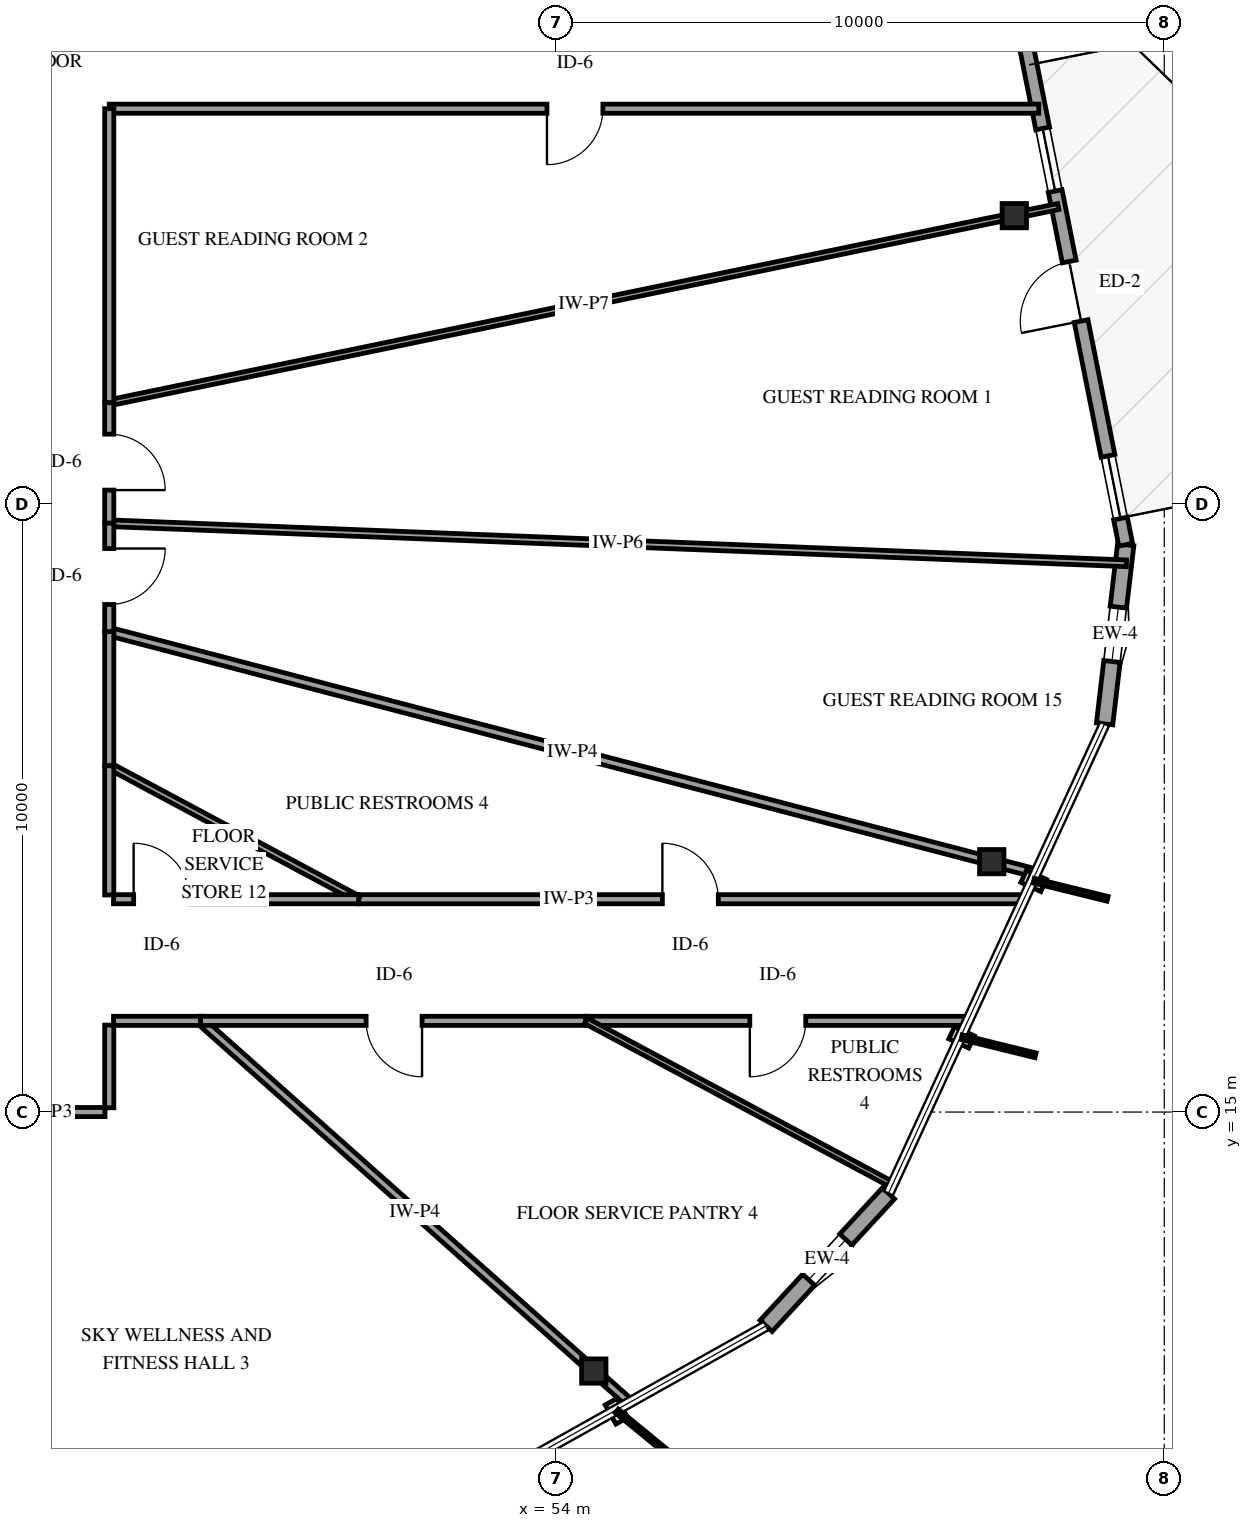
"""IFC4 building model, lengths in metres.
Left out: names, types, materials, properties, quantities, classifications, styles, units other than length and angle.
Written with IfcOpenShell. Run it as: python <this file> out.ifc"""

import sys

from ifc_helpers import new_model, si_unit, direction, frame, frame_2d, origin, origin_2d, place, context, subcontext, project, spatial, rectangle, i_section, extrude, element, fill, save


model = new_model("IFC4")
c1 = context("Model", 3, precision=1e-05, world=origin(), true_north=direction((0.0, 1.0)))
c2 = subcontext(c1, "Body", "Model", "MODEL_VIEW")
j1 = project(units=[si_unit("LENGTHUNIT", "METRE"), si_unit("PLANEANGLEUNIT", "RADIAN")], contexts=[c1])
p1 = place(None, origin())
s1 = spatial("IfcSite", under=j1, at=p1, CompositionType="ELEMENT")
p2 = place(p1, origin())
s2 = spatial("IfcBuilding", under=s1, at=p2, CompositionType="ELEMENT")
p3 = place(p2, frame((0.0, 0.0, 272.5)))
s3 = spatial("IfcBuildingStorey", under=s2, at=p3, CompositionType="ELEMENT", Elevation=272.5)
for number, where, z_axis, x_axis in (
    (1, (61.534, 29.741, 0.0), (0.0, 0.0, 1.0), (1.0, 0.0, 0.0)),
    (2, (54.618, 10.74, 0.0), (0.0, 0.0, 1.0), (1.0, 0.0, 0.0)),
    (3, (61.163, 19.117, 0.0), (0.0, 0.0, 1.0), (1.0, 0.0, 0.0)),
):
    element("IfcColumn", number, at=place(p3, frame(where, z_axis=z_axis, x_axis=x_axis)), inside=s3, PredefinedType="COLUMN", context=c2, shape_type="SweptSolid", body=[
        extrude(i_section(OverallWidth=0.401, OverallDepth=0.399, WebThickness=0.025, FlangeThickness=0.04, FilletRadius=0.038, at=origin_2d()), origin(), (0.0, 0.0, 1.0), 3.75),
    ])
p4 = place(p3, frame((57.452, 11.483, 0.0), z_axis=(0.0, 0.0, 1.0), x_axis=(0.678358713044, 0.734730873475, 0.0)))
e4 = element("IfcWall", 4, at=p4, inside=s3, PredefinedType="SOLIDWALL", context=c2, shape_type="SweptSolid", body=[
    extrude(rectangle(XDim=2.967, YDim=0.27, at=frame_2d((1.483, 0.0))), origin(), (0.0, 0.0, 1.0), 2.829),
])
p5 = place(p4, frame((1.033, 0.0, 0.75)))
e5 = element("IfcOpeningElement", 5, at=p5, cuts=e4, PredefinedType="OPENING", context=c2, shape_type="SweptSolid", body=[
    extrude(rectangle(XDim=0.9, YDim=1.5, at=frame_2d((0.45, 0.75))), frame((0.0, 0.145, 0.0), z_axis=(0.0, -1.0, 0.0), x_axis=(1.0, 0.0, 0.0)), (0.0, 0.0, 1.0), 0.29),
])
p6 = place(p3, frame((63.019, 21.383, 0.0), z_axis=(0.0, 0.0, 1.0), x_axis=(0.11702268659, 0.993129241752, 0.0)))
e6 = element("IfcWall", 6, at=p6, inside=s3, PredefinedType="SOLIDWALL", context=c2, shape_type="SweptSolid", body=[
    extrude(rectangle(XDim=2.967, YDim=0.27, at=frame_2d((1.483, 0.0))), origin(), (0.0, 0.0, 1.0), 2.829),
])
p7 = place(p6, frame((1.033, 0.0, 0.75)))
e7 = element("IfcOpeningElement", 7, at=p7, cuts=e6, PredefinedType="OPENING", context=c2, shape_type="SweptSolid", body=[
    extrude(rectangle(XDim=0.9, YDim=1.5, at=frame_2d((0.45, 0.75))), frame((0.0, 0.145, 0.0), z_axis=(0.0, -1.0, 0.0), x_axis=(1.0, 0.0, 0.0)), (0.0, 0.0, 1.0), 0.29),
])
p8 = place(p3, frame((63.366, 24.33, 0.0), z_axis=(0.0, 0.0, 1.0), x_axis=(-0.195602411619, 0.980683280457, 0.0)))
e8 = element("IfcWall", 8, at=p8, inside=s3, PredefinedType="SOLIDWALL", context=c2, shape_type="SweptSolid", body=[
    extrude(rectangle(XDim=8.5, YDim=0.23, at=frame_2d((4.25, 0.0))), origin(), (0.0, 0.0, 1.0), 2.829),
])
p9 = place(p8, frame((3.75, 0.0, 0.0)))
e9 = element("IfcOpeningElement", 9, at=p9, cuts=e8, PredefinedType="OPENING", context=c2, shape_type="SweptSolid", body=[
    extrude(rectangle(XDim=1.0, YDim=2.15, at=frame_2d((0.5, 1.075))), frame((0.0, 0.125, 0.0), z_axis=(0.0, -1.0, 0.0), x_axis=(1.0, 0.0, 0.0)), (0.0, 0.0, 1.0), 0.25),
])
p10 = place(p8, frame((0.44, 0.0, 0.72)))
e10 = element("IfcOpeningElement", 10, at=p10, cuts=e8, PredefinedType="OPENING", context=c2, shape_type="SweptSolid", body=[
    extrude(rectangle(XDim=1.05, YDim=1.55, at=frame_2d((0.525, 0.775))), frame((0.0, 0.125, 0.0), z_axis=(0.0, -1.0, 0.0), x_axis=(1.0, 0.0, 0.0)), (0.0, 0.0, 1.0), 0.25),
])
p11 = place(p8, frame((5.93, 0.0, 0.72)))
e11 = element("IfcOpeningElement", 11, at=p11, cuts=e8, PredefinedType="OPENING", context=c2, shape_type="SweptSolid", body=[
    extrude(rectangle(XDim=1.05, YDim=1.55, at=frame_2d((0.525, 0.775))), frame((0.0, 0.125, 0.0), z_axis=(0.0, -1.0, 0.0), x_axis=(1.0, 0.0, 0.0)), (0.0, 0.0, 1.0), 0.25),
])
p12 = place(p3, frame((63.378, 24.024, 0.0), z_axis=(0.0, 0.0, 1.0), x_axis=(-0.999224498299, 0.039375144421, 0.0)))
e12 = element("IfcWall", 12, at=p12, inside=s3, PredefinedType="PARTITIONING", context=c2, shape_type="SweptSolid", body=[
    extrude(rectangle(XDim=16.741, YDim=0.11, at=frame_2d((8.371, 0.0))), origin(), (0.0, 0.0, 1.0), 3.45),
])
p13 = place(p3, frame((46.65, 26.664, 0.0), z_axis=(0.0, 0.0, 1.0), x_axis=(0.979285564853, 0.202484030163, 0.0)))
e13 = element("IfcWall", 13, at=p13, inside=s3, PredefinedType="PARTITIONING", context=c2, shape_type="SweptSolid", body=[
    extrude(rectangle(XDim=15.937, YDim=0.1, at=frame_2d((7.969, 0.0))), origin(), (0.0, 0.0, 1.0), 2.745),
])
p14 = place(p3, frame((46.65, 22.901, 0.0), z_axis=(0.0, 0.0, 1.0), x_axis=(0.967652002087, -0.252288729151, 0.0)))
e14 = element("IfcWall", 14, at=p14, inside=s3, PredefinedType="PARTITIONING", context=c2, shape_type="SweptSolid", body=[
    extrude(rectangle(XDim=15.747, YDim=0.14, at=frame_2d((7.874, 0.0))), origin(), (0.0, 0.0, 1.0), 3.45),
])
p15 = place(p3, frame((61.936, 31.5, 0.0), z_axis=(0.0, 0.0, 1.0), x_axis=(-1.0, 0.0, 0.0)))
e15 = element("IfcWall", 15, at=p15, inside=s3, PredefinedType="PARTITIONING", context=c2, shape_type="SweptSolid", body=[
    extrude(rectangle(XDim=15.286, YDim=0.15, at=frame_2d((7.643, 0.0))), origin(), (0.0, 0.0, 1.0), 2.824),
])
p16 = place(p15, frame((7.168, 0.0, 0.0)))
e16 = element("IfcOpeningElement", 16, at=p16, cuts=e15, PredefinedType="OPENING", context=c2, shape_type="SweptSolid", body=[
    extrude(rectangle(XDim=0.92, YDim=2.12, at=frame_2d((0.46, 1.06))), frame((0.0, 0.085, 0.0), z_axis=(0.0, -1.0, 0.0), x_axis=(1.0, 0.0, 0.0)), (0.0, 0.0, 1.0), 0.17),
])
p17 = place(p3, frame((50.751, 18.5, 0.0), z_axis=(0.0, 0.0, 1.0), x_axis=(1.0, 0.0, 0.0)))
e17 = element("IfcWall", 17, at=p17, inside=s3, PredefinedType="PARTITIONING", context=c2, shape_type="SweptSolid", body=[
    extrude(rectangle(XDim=10.94, YDim=0.15, at=frame_2d((5.47, 0.0))), origin(), (0.0, 0.0, 1.0), 2.745),
])
p18 = place(p17, frame((4.995, 0.0, 0.0)))
e18 = element("IfcOpeningElement", 18, at=p18, cuts=e17, PredefinedType="OPENING", context=c2, shape_type="SweptSolid", body=[
    extrude(rectangle(XDim=0.92, YDim=2.12, at=frame_2d((0.46, 1.06))), frame((0.0, 0.085, 0.0), z_axis=(0.0, -1.0, 0.0), x_axis=(1.0, 0.0, 0.0)), (0.0, 0.0, 1.0), 0.17),
])
p19 = place(p3, frame((48.149, 16.5, 0.0), z_axis=(0.0, 0.0, 1.0), x_axis=(0.746851278403, -0.664991103661, 0.0)))
e19 = element("IfcWall", 19, at=p19, inside=s3, PredefinedType="PARTITIONING", context=c2, shape_type="SweptSolid", body=[
    extrude(rectangle(XDim=9.442, YDim=0.14, at=frame_2d((4.721, 0.0))), origin(), (0.0, 0.0, 1.0), 3.45),
])
p20 = place(p3, frame((54.489, 16.5, 0.0), z_axis=(0.0, 0.0, 1.0), x_axis=(-1.0, 0.0, 0.0)))
e20 = element("IfcWall", 20, at=p20, inside=s3, PredefinedType="PARTITIONING", context=c2, shape_type="SweptSolid", body=[
    extrude(rectangle(XDim=6.34, YDim=0.15, at=frame_2d((3.17, 0.0))), origin(), (0.0, 0.0, 1.0), 2.828),
])
p21 = place(p20, frame((2.695, 0.0, 0.0)))
e21 = element("IfcOpeningElement", 21, at=p21, cuts=e20, PredefinedType="OPENING", context=c2, shape_type="SweptSolid", body=[
    extrude(rectangle(XDim=0.92, YDim=2.12, at=frame_2d((0.46, 1.06))), frame((0.0, 0.085, 0.0), z_axis=(0.0, -1.0, 0.0), x_axis=(1.0, 0.0, 0.0)), (0.0, 0.0, 1.0), 0.17),
])
p22 = place(p3, frame((60.77, 16.5, 0.0), z_axis=(0.0, 0.0, 1.0), x_axis=(-1.0, 0.0, 0.0)))
e22 = element("IfcWall", 22, at=p22, inside=s3, PredefinedType="PARTITIONING", context=c2, shape_type="SweptSolid", body=[
    extrude(rectangle(XDim=6.281, YDim=0.15, at=frame_2d((3.141, 0.0))), origin(), (0.0, 0.0, 1.0), 3.45),
])
p23 = place(p22, frame((2.666, 0.0, 0.0)))
e23 = element("IfcOpeningElement", 23, at=p23, cuts=e22, PredefinedType="OPENING", context=c2, shape_type="SweptSolid", body=[
    extrude(rectangle(XDim=0.92, YDim=2.12, at=frame_2d((0.46, 1.06))), frame((0.0, 0.085, 0.0), z_axis=(0.0, -1.0, 0.0), x_axis=(1.0, 0.0, 0.0)), (0.0, 0.0, 1.0), 0.17),
])
p24 = place(p3, frame((54.489, 16.5, 0.0), z_axis=(0.0, 0.0, 1.0), x_axis=(0.881769355999, -0.471680827277, 0.0)))
e24 = element("IfcWall", 24, at=p24, inside=s3, PredefinedType="PARTITIONING", context=c2, shape_type="SweptSolid", body=[
    extrude(rectangle(XDim=5.716, YDim=0.1, at=frame_2d((2.858, 0.0))), origin(), (0.0, 0.0, 1.0), 3.45),
])
p25 = place(p3, frame((46.65, 31.5, 0.0), z_axis=(0.0, 0.0, 1.0), x_axis=(0.0, -1.0, 0.0)))
e25 = element("IfcWall", 25, at=p25, inside=s3, PredefinedType="PARTITIONING", context=c2, shape_type="SweptSolid", body=[
    extrude(rectangle(XDim=4.836, YDim=0.15, at=frame_2d((2.418, 0.0))), origin(), (0.0, 0.0, 1.0), 3.45),
])
p26 = place(p3, frame((46.65, 20.694, 0.0), z_axis=(0.0, 0.0, 1.0), x_axis=(0.88174046898, -0.47173482526, 0.0)))
e26 = element("IfcWall", 26, at=p26, inside=s3, PredefinedType="PARTITIONING", context=c2, shape_type="SweptSolid", body=[
    extrude(rectangle(XDim=4.651, YDim=0.11, at=frame_2d((2.326, 0.0))), origin(), (0.0, 0.0, 1.0), 3.45),
])
p27 = place(p3, frame((46.72, 18.5, 0.0), z_axis=(0.0, 0.0, 1.0), x_axis=(1.0, 0.0, 0.0)))
e27 = element("IfcWall", 27, at=p27, inside=s3, PredefinedType="PARTITIONING", context=c2, shape_type="SweptSolid", body=[
    extrude(rectangle(XDim=4.031, YDim=0.15, at=frame_2d((2.016, 0.0))), origin(), (0.0, 0.0, 1.0), 2.745),
])
p28 = place(p27, frame((0.331, 0.0, 0.0)))
e28 = element("IfcOpeningElement", 28, at=p28, cuts=e27, PredefinedType="OPENING", context=c2, shape_type="SweptSolid", body=[
    extrude(rectangle(XDim=0.92, YDim=2.12, at=frame_2d((0.46, 1.06))), frame((0.0, 0.085, 0.0), z_axis=(0.0, -1.0, 0.0), x_axis=(1.0, 0.0, 0.0)), (0.0, 0.0, 1.0), 0.17),
])
p29 = place(p3, frame((46.65, 22.901, 0.0), z_axis=(0.0, 0.0, 1.0), x_axis=(0.0, -1.0, 0.0)))
e29 = element("IfcWall", 29, at=p29, inside=s3, PredefinedType="PARTITIONING", context=c2, shape_type="SweptSolid", body=[
    extrude(rectangle(XDim=2.207, YDim=0.15, at=frame_2d((1.104, 0.0))), origin(), (0.0, 0.0, 1.0), 3.45),
])
p30 = place(p3, frame((46.65, 20.694, 0.0), z_axis=(0.0, 0.0, 1.0), x_axis=(0.0, -1.0, 0.0)))
e30 = element("IfcWall", 30, at=p30, inside=s3, PredefinedType="PARTITIONING", context=c2, shape_type="SweptSolid", body=[
    extrude(rectangle(XDim=2.124, YDim=0.15, at=frame_2d((1.062, 0.0))), origin(), (0.0, 0.0, 1.0), 3.45),
])
p31 = place(p3, frame((46.65, 26.664, 0.0), z_axis=(0.0, 0.0, 1.0), x_axis=(0.0, -1.0, 0.0)))
e31 = element("IfcWall", 31, at=p31, inside=s3, PredefinedType="PARTITIONING", context=c2, shape_type="SweptSolid", body=[
    extrude(rectangle(XDim=1.981, YDim=0.15, at=frame_2d((0.99, 0.0))), origin(), (0.0, 0.0, 1.0), 3.45),
])
p32 = place(p31, frame((0.516, 0.0, 0.0)))
e32 = element("IfcOpeningElement", 32, at=p32, cuts=e31, PredefinedType="OPENING", context=c2, shape_type="SweptSolid", body=[
    extrude(rectangle(XDim=0.92, YDim=2.12, at=frame_2d((0.46, 1.06))), frame((0.0, 0.085, 0.0), z_axis=(0.0, -1.0, 0.0), x_axis=(1.0, 0.0, 0.0)), (0.0, 0.0, 1.0), 0.17),
])
p33 = place(p3, frame((46.58, 15.0, 0.0), z_axis=(0.0, 0.0, 1.0), x_axis=(-1.0, 0.0, 0.0)))
e33 = element("IfcWall", 33, at=p33, inside=s3, PredefinedType="PARTITIONING", context=c2, shape_type="SweptSolid", body=[
    extrude(rectangle(XDim=1.91, YDim=0.15, at=frame_2d((0.955, 0.0))), origin(), (0.0, 0.0, 1.0), 3.45),
])
p34 = place(p3, frame((46.65, 24.683, 0.0), z_axis=(0.0, 0.0, 1.0), x_axis=(0.0, -1.0, 0.0)))
e34 = element("IfcWall", 34, at=p34, inside=s3, PredefinedType="PARTITIONING", context=c2, shape_type="SweptSolid", body=[
    extrude(rectangle(XDim=1.782, YDim=0.15, at=frame_2d((0.891, 0.0))), origin(), (0.0, 0.0, 1.0), 3.45),
])
p35 = place(p34, frame((0.416, 0.0, 0.0)))
e35 = element("IfcOpeningElement", 35, at=p35, cuts=e34, PredefinedType="OPENING", context=c2, shape_type="SweptSolid", body=[
    extrude(rectangle(XDim=0.92, YDim=2.12, at=frame_2d((0.46, 1.06))), frame((0.0, 0.085, 0.0), z_axis=(0.0, -1.0, 0.0), x_axis=(1.0, 0.0, 0.0)), (0.0, 0.0, 1.0), 0.17),
])
p36 = place(p3, frame((48.149, 16.5, 0.0), z_axis=(0.0, 0.0, 1.0), x_axis=(-1.0, 0.0, 0.0)))
e36 = element("IfcWall", 36, at=p36, inside=s3, PredefinedType="PARTITIONING", context=c2, shape_type="SweptSolid", body=[
    extrude(rectangle(XDim=1.429, YDim=0.15, at=frame_2d((0.714, 0.0))), origin(), (0.0, 0.0, 1.0), 2.828),
])
p37 = place(p3, frame((46.65, 16.43, 0.0), z_axis=(0.0, 0.0, 1.0), x_axis=(0.0, -1.0, 0.0)))
e37 = element("IfcWall", 37, at=p37, inside=s3, PredefinedType="PARTITIONING", context=c2, shape_type="SweptSolid", body=[
    extrude(rectangle(XDim=1.36, YDim=0.15, at=frame_2d((0.68, 0.0))), origin(), (0.0, 0.0, 1.0), 3.45),
])
p38 = place(p5, origin())
e38 = element("IfcWindow", 38, at=p38, inside=s3, PartitioningType="SINGLE_PANEL", PredefinedType="WINDOW", context=c2, shape_type="SweptSolid", body=[
    extrude(rectangle(XDim=0.9, YDim=1.5, at=frame_2d((0.45, 0.75))), frame((0.0, 0.03, 0.0), z_axis=(0.0, -1.0, 0.0), x_axis=(1.0, 0.0, 0.0)), (0.0, 0.0, 1.0), 0.06),
])
fill(e5, e38)
p39 = place(p7, origin())
e39 = element("IfcWindow", 39, at=p39, inside=s3, PartitioningType="SINGLE_PANEL", PredefinedType="WINDOW", context=c2, shape_type="SweptSolid", body=[
    extrude(rectangle(XDim=0.9, YDim=1.5, at=frame_2d((0.45, 0.75))), frame((0.0, 0.03, 0.0), z_axis=(0.0, -1.0, 0.0), x_axis=(1.0, 0.0, 0.0)), (0.0, 0.0, 1.0), 0.06),
])
fill(e7, e39)
p40 = place(p9, origin())
e40 = element("IfcDoor", 40, at=p40, inside=s3, OperationType="SINGLE_SWING_LEFT", PredefinedType="DOOR", context=c2, shape_type="SweptSolid", body=[
    extrude(rectangle(XDim=1.0, YDim=2.15, at=frame_2d((0.5, 1.075))), frame((0.0, 0.025, 0.0), z_axis=(0.0, -1.0, 0.0), x_axis=(1.0, 0.0, 0.0)), (0.0, 0.0, 1.0), 0.05),
])
fill(e9, e40)
p41 = place(p10, origin())
e41 = element("IfcWindow", 41, at=p41, inside=s3, PartitioningType="SINGLE_PANEL", PredefinedType="WINDOW", context=c2, shape_type="SweptSolid", body=[
    extrude(rectangle(XDim=1.05, YDim=1.55, at=frame_2d((0.525, 0.775))), frame((0.0, 0.03, 0.0), z_axis=(0.0, -1.0, 0.0), x_axis=(1.0, 0.0, 0.0)), (0.0, 0.0, 1.0), 0.06),
])
fill(e10, e41)
p42 = place(p11, origin())
e42 = element("IfcWindow", 42, at=p42, inside=s3, PartitioningType="SINGLE_PANEL", PredefinedType="WINDOW", context=c2, shape_type="SweptSolid", body=[
    extrude(rectangle(XDim=1.05, YDim=1.55, at=frame_2d((0.525, 0.775))), frame((0.0, 0.03, 0.0), z_axis=(0.0, -1.0, 0.0), x_axis=(1.0, 0.0, 0.0)), (0.0, 0.0, 1.0), 0.06),
])
fill(e11, e42)
p43 = place(p16, origin())
e43 = element("IfcDoor", 43, at=p43, inside=s3, OperationType="SINGLE_SWING_RIGHT", PredefinedType="DOOR", context=c2, shape_type="SweptSolid", body=[
    extrude(rectangle(XDim=0.92, YDim=2.12, at=frame_2d((0.46, 1.06))), frame((0.0, 0.025, 0.0), z_axis=(0.0, -1.0, 0.0), x_axis=(1.0, 0.0, 0.0)), (0.0, 0.0, 1.0), 0.05),
])
fill(e16, e43)
p44 = place(p18, origin())
e44 = element("IfcDoor", 44, at=p44, inside=s3, OperationType="SINGLE_SWING_LEFT", PredefinedType="DOOR", context=c2, shape_type="SweptSolid", body=[
    extrude(rectangle(XDim=0.92, YDim=2.12, at=frame_2d((0.46, 1.06))), frame((0.0, 0.025, 0.0), z_axis=(0.0, -1.0, 0.0), x_axis=(1.0, 0.0, 0.0)), (0.0, 0.0, 1.0), 0.05),
])
fill(e18, e44)
p45 = place(p21, origin())
e45 = element("IfcDoor", 45, at=p45, inside=s3, OperationType="SINGLE_SWING_LEFT", PredefinedType="DOOR", context=c2, shape_type="SweptSolid", body=[
    extrude(rectangle(XDim=0.92, YDim=2.12, at=frame_2d((0.46, 1.06))), frame((0.0, 0.025, 0.0), z_axis=(0.0, -1.0, 0.0), x_axis=(1.0, 0.0, 0.0)), (0.0, 0.0, 1.0), 0.05),
])
fill(e21, e45)
p46 = place(p23, origin())
e46 = element("IfcDoor", 46, at=p46, inside=s3, OperationType="SINGLE_SWING_RIGHT", PredefinedType="DOOR", context=c2, shape_type="SweptSolid", body=[
    extrude(rectangle(XDim=0.92, YDim=2.12, at=frame_2d((0.46, 1.06))), frame((0.0, 0.025, 0.0), z_axis=(0.0, -1.0, 0.0), x_axis=(1.0, 0.0, 0.0)), (0.0, 0.0, 1.0), 0.05),
])
fill(e23, e46)
p47 = place(p28, origin())
e47 = element("IfcDoor", 47, at=p47, inside=s3, OperationType="SINGLE_SWING_LEFT", PredefinedType="DOOR", context=c2, shape_type="SweptSolid", body=[
    extrude(rectangle(XDim=0.92, YDim=2.12, at=frame_2d((0.46, 1.06))), frame((0.0, 0.025, 0.0), z_axis=(0.0, -1.0, 0.0), x_axis=(1.0, 0.0, 0.0)), (0.0, 0.0, 1.0), 0.05),
])
fill(e28, e47)
p48 = place(p32, origin())
e48 = element("IfcDoor", 48, at=p48, inside=s3, OperationType="SINGLE_SWING_RIGHT", PredefinedType="DOOR", context=c2, shape_type="SweptSolid", body=[
    extrude(rectangle(XDim=0.92, YDim=2.12, at=frame_2d((0.46, 1.06))), frame((0.0, 0.025, 0.0), z_axis=(0.0, -1.0, 0.0), x_axis=(1.0, 0.0, 0.0)), (0.0, 0.0, 1.0), 0.05),
])
fill(e32, e48)
p49 = place(p35, origin())
e49 = element("IfcDoor", 49, at=p49, inside=s3, OperationType="SINGLE_SWING_LEFT", PredefinedType="DOOR", context=c2, shape_type="SweptSolid", body=[
    extrude(rectangle(XDim=0.92, YDim=2.12, at=frame_2d((0.46, 1.06))), frame((0.0, 0.025, 0.0), z_axis=(0.0, -1.0, 0.0), x_axis=(1.0, 0.0, 0.0)), (0.0, 0.0, 1.0), 0.05),
])
fill(e35, e49)
save(model, sys.argv[1])
